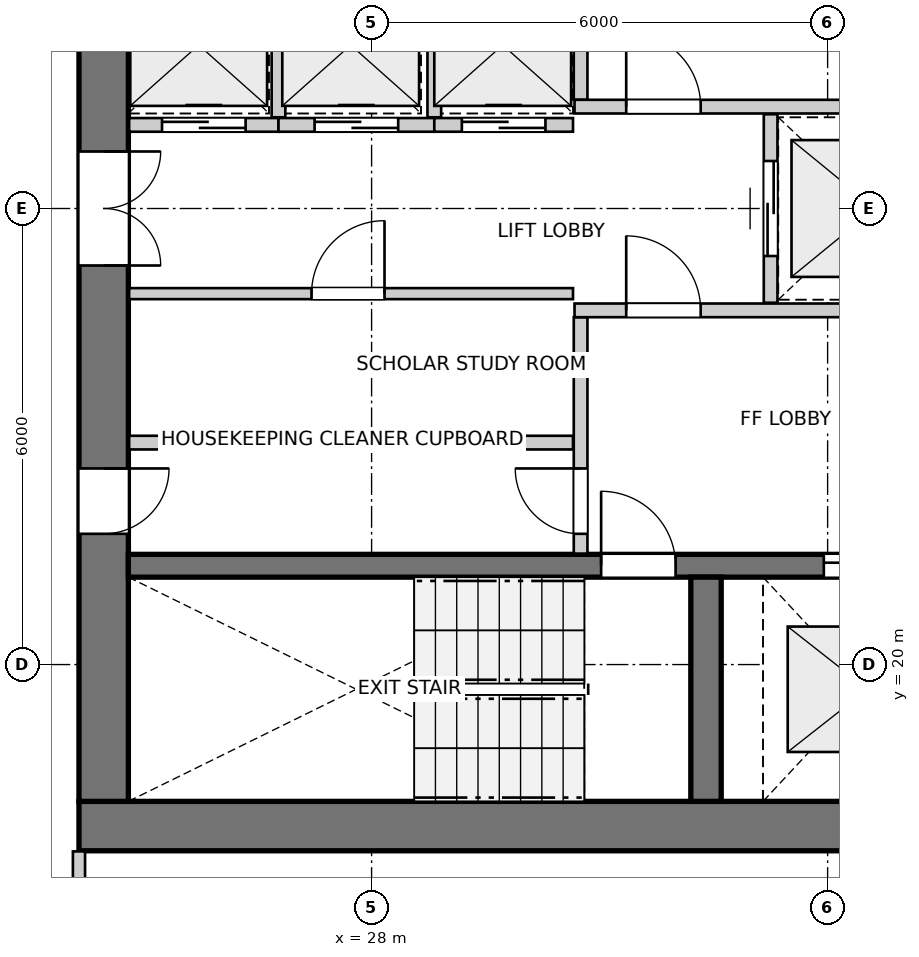
"""IFC4 building model, lengths in metres.
Left out: names, types, materials, properties, quantities, classifications, styles, units other than length and angle.
Written with IfcOpenShell. Run it as: python <this file> out.ifc"""

import sys

from ifc_helpers import new_model, si_unit, direction, frame, frame_2d, origin, place, context, subcontext, project, spatial, rectangle, extrude, source, transform, mapped, element, fill, save


model = new_model("IFC4")
c1 = context("Model", 3, precision=1e-05, world=origin(), true_north=direction((0.0, 1.0)))
c2 = subcontext(c1, "Body", "Model", "MODEL_VIEW")
j1 = project(units=[si_unit("LENGTHUNIT", "METRE"), si_unit("PLANEANGLEUNIT", "RADIAN")], contexts=[c1])
p1 = place(None, origin())
s1 = spatial("IfcSite", under=j1, at=p1, CompositionType="ELEMENT")
p2 = place(p1, origin())
s2 = spatial("IfcBuilding", under=s1, at=p2, CompositionType="ELEMENT")
p3 = place(p2, frame((0.0, 0.0, 133.0)))
s3 = spatial("IfcBuildingStorey", under=s2, at=p3, CompositionType="ELEMENT", Elevation=133.0)
p4 = place(p3, frame((24.15, 17.875, 0.0), z_axis=(0.0, 0.0, 1.0), x_axis=(1.0, 0.0, 0.0)))
e1 = element("IfcWall", 1, at=p4, inside=s3, PredefinedType="SHEAR", context=c2, shape_type="SweptSolid", body=[
    extrude(rectangle(XDim=12.4, YDim=0.65, at=frame_2d((6.2, 0.0))), origin(), (0.0, 0.0, 1.0), 2.95),
])
p5 = place(p3, frame((24.475, 33.8, 0.0), z_axis=(0.0, 0.0, 1.0), x_axis=(0.0, -1.0, 0.0)))
e2 = element("IfcWall", 2, at=p5, inside=s3, PredefinedType="SHEAR", context=c2, shape_type="SweptSolid", body=[
    extrude(rectangle(XDim=15.6, YDim=0.65, at=frame_2d((7.8, 0.0))), origin(), (0.0, 0.0, 1.0), 2.95),
])
p6 = place(p5, frame((7.05, 0.0, 0.0)))
e3 = element("IfcOpeningElement", 3, at=p6, cuts=e2, PredefinedType="OPENING", context=c2, shape_type="SweptSolid", body=[
    extrude(rectangle(XDim=1.5, YDim=2.15, at=frame_2d((0.75, 1.075))), frame((0.0, 0.335, 0.0), z_axis=(0.0, -1.0, 0.0), x_axis=(1.0, 0.0, 0.0)), (0.0, 0.0, 1.0), 0.67),
])
p7 = place(p5, frame((3.52, 0.0, 0.0)))
e4 = element("IfcOpeningElement", 4, at=p7, cuts=e2, PredefinedType="OPENING", context=c2, shape_type="SweptSolid", body=[
    extrude(rectangle(XDim=0.86, YDim=2.05, at=frame_2d((0.43, 1.025))), frame((0.0, 0.335, 0.0), z_axis=(0.0, -1.0, 0.0), x_axis=(1.0, 0.0, 0.0)), (0.0, 0.0, 1.0), 0.67),
])
p8 = place(p5, frame((11.22, 0.0, 0.0)))
e5 = element("IfcOpeningElement", 5, at=p8, cuts=e2, PredefinedType="OPENING", context=c2, shape_type="SweptSolid", body=[
    extrude(rectangle(XDim=0.86, YDim=2.05, at=frame_2d((0.43, 1.025))), frame((0.0, 0.335, 0.0), z_axis=(0.0, -1.0, 0.0), x_axis=(1.0, 0.0, 0.0)), (0.0, 0.0, 1.0), 0.67),
])
p9 = place(p3, frame((24.8, 21.3, 0.0), z_axis=(0.0, 0.0, 1.0), x_axis=(1.0, 0.0, 0.0)))
e6 = element("IfcWall", 6, at=p9, inside=s3, PredefinedType="SHEAR", context=c2, shape_type="SweptSolid", body=[
    extrude(rectangle(XDim=11.1, YDim=0.3, at=frame_2d((5.55, 0.0))), origin(), (0.0, 0.0, 1.0), 2.95),
])
p10 = place(p9, frame((6.22, 0.0, 0.0)))
e7 = element("IfcOpeningElement", 7, at=p10, cuts=e6, PredefinedType="OPENING", context=c2, shape_type="SweptSolid", body=[
    extrude(rectangle(XDim=0.98, YDim=2.15, at=frame_2d((0.49, 1.075))), frame((0.0, 0.16, 0.0), z_axis=(0.0, -1.0, 0.0), x_axis=(1.0, 0.0, 0.0)), (0.0, 0.0, 1.0), 0.32),
])
p11 = place(p9, frame((9.15, 0.0, 0.0)))
e8 = element("IfcOpeningElement", 8, at=p11, cuts=e6, PredefinedType="OPENING", context=c2, shape_type="SweptSolid", body=[
    extrude(rectangle(XDim=1.15, YDim=2.15, at=frame_2d((0.575, 1.075))), frame((0.0, 0.16, 0.0), z_axis=(0.0, -1.0, 0.0), x_axis=(1.0, 0.0, 0.0)), (0.0, 0.0, 1.0), 0.32),
])
p12 = place(p3, frame((32.4, 18.2, 0.0), z_axis=(0.0, 0.0, 1.0), x_axis=(0.0, 1.0, 0.0)))
e9 = element("IfcWall", 9, at=p12, inside=s3, PredefinedType="SHEAR", context=c2, shape_type="SweptSolid", body=[
    extrude(rectangle(XDim=2.95, YDim=0.4, at=frame_2d((1.475, 0.0))), origin(), (0.0, 0.0, 1.0), 2.95),
])
p13 = place(p3, frame((30.75, 21.46, 0.0), z_axis=(0.0, 0.0, 1.0), x_axis=(0.0, 1.0, 0.0)))
e10 = element("IfcWall", 10, at=p13, inside=s3, PredefinedType="PARTITIONING", context=c2, shape_type="SweptSolid", body=[
    extrude(rectangle(XDim=3.11, YDim=0.18, at=frame_2d((1.555, 0.0))), origin(), (0.0, 0.0, 1.0), 2.95),
])
p14 = place(p13, frame((0.26, 0.0, 0.0)))
e11 = element("IfcOpeningElement", 11, at=p14, cuts=e10, PredefinedType="OPENING", context=c2, shape_type="SweptSolid", body=[
    extrude(rectangle(XDim=0.86, YDim=2.05, at=frame_2d((0.43, 1.025))), frame((0.0, 0.1, 0.0), z_axis=(0.0, -1.0, 0.0), x_axis=(1.0, 0.0, 0.0)), (0.0, 0.0, 1.0), 0.2),
])
p15 = place(p3, frame((30.67, 24.66, 0.0), z_axis=(0.0, 0.0, 1.0), x_axis=(1.0, 0.0, 0.0)))
e12 = element("IfcWall", 12, at=p15, inside=s3, PredefinedType="PARTITIONING", context=c2, shape_type="SweptSolid", body=[
    extrude(rectangle(XDim=5.22, YDim=0.18, at=frame_2d((2.61, 0.0))), origin(), (0.0, 0.0, 1.0), 2.95),
])
p16 = place(p15, frame((0.68, 0.0, 0.0)))
e13 = element("IfcOpeningElement", 13, at=p16, cuts=e12, PredefinedType="OPENING", context=c2, shape_type="SweptSolid", body=[
    extrude(rectangle(XDim=0.98, YDim=2.15, at=frame_2d((0.49, 1.075))), frame((0.0, 0.1, 0.0), z_axis=(0.0, -1.0, 0.0), x_axis=(1.0, 0.0, 0.0)), (0.0, 0.0, 1.0), 0.2),
])
p17 = place(p3, frame((30.75, 27.43, 0.0), z_axis=(0.0, 0.0, 1.0), x_axis=(0.0, 1.0, 0.0)))
e14 = element("IfcWall", 14, at=p17, inside=s3, PredefinedType="PARTITIONING", context=c2, shape_type="SweptSolid", body=[
    extrude(rectangle(XDim=3.11, YDim=0.18, at=frame_2d((1.555, 0.0))), origin(), (0.0, 0.0, 1.0), 2.95),
])
p18 = place(p17, frame((1.98, 0.0, 0.0)))
e15 = element("IfcOpeningElement", 15, at=p18, cuts=e14, PredefinedType="OPENING", context=c2, shape_type="SweptSolid", body=[
    extrude(rectangle(XDim=0.86, YDim=2.05, at=frame_2d((0.43, 1.025))), frame((0.0, 0.1, 0.0), z_axis=(0.0, -1.0, 0.0), x_axis=(1.0, 0.0, 0.0)), (0.0, 0.0, 1.0), 0.2),
])
p19 = place(p3, frame((30.67, 27.34, 0.0), z_axis=(0.0, 0.0, 1.0), x_axis=(1.0, 0.0, 0.0)))
e16 = element("IfcWall", 16, at=p19, inside=s3, PredefinedType="PARTITIONING", context=c2, shape_type="SweptSolid", body=[
    extrude(rectangle(XDim=5.22, YDim=0.18, at=frame_2d((2.61, 0.0))), origin(), (0.0, 0.0, 1.0), 2.95),
])
p20 = place(p19, frame((0.68, 0.0, 0.0)))
e17 = element("IfcOpeningElement", 17, at=p20, cuts=e16, PredefinedType="OPENING", context=c2, shape_type="SweptSolid", body=[
    extrude(rectangle(XDim=0.98, YDim=2.15, at=frame_2d((0.49, 1.075))), frame((0.0, 0.1, 0.0), z_axis=(0.0, -1.0, 0.0), x_axis=(1.0, 0.0, 0.0)), (0.0, 0.0, 1.0), 0.2),
])
p21 = place(p3, frame((33.25, 24.76, 0.0), z_axis=(0.0, 0.0, 1.0), x_axis=(0.0, 1.0, 0.0)))
e18 = element("IfcWall", 18, at=p21, inside=s3, PredefinedType="PARTITIONING", context=c2, shape_type="SweptSolid", body=[
    extrude(rectangle(XDim=2.48, YDim=0.18, at=frame_2d((1.24, 0.0))), origin(), (0.0, 0.0, 1.0), 2.95),
])
p22 = place(p21, frame((0.615, 0.0, 0.0)))
e19 = element("IfcOpeningElement", 19, at=p22, cuts=e18, PredefinedType="OPENING", context=c2, shape_type="SweptSolid", body=[
    extrude(rectangle(XDim=1.25, YDim=2.15, at=frame_2d((0.625, 1.075))), frame((0.0, 0.1, 0.0), z_axis=(0.0, -1.0, 0.0), x_axis=(1.0, 0.0, 0.0)), (0.0, 0.0, 1.0), 0.2),
])
p23 = place(p3, frame((24.81, 22.92, 0.0), z_axis=(0.0, 0.0, 1.0), x_axis=(1.0, 0.0, 0.0)))
e20 = element("IfcWall", 20, at=p23, inside=s3, PredefinedType="PARTITIONING", context=c2, shape_type="SweptSolid", body=[
    extrude(rectangle(XDim=5.84, YDim=0.18, at=frame_2d((2.92, 0.0))), origin(), (0.0, 0.0, 1.0), 2.95),
])
p24 = place(p3, frame((24.81, 24.88, 0.0), z_axis=(0.0, 0.0, 1.0), x_axis=(1.0, 0.0, 0.0)))
e21 = element("IfcWall", 21, at=p24, inside=s3, PredefinedType="PARTITIONING", context=c2, shape_type="SweptSolid", body=[
    extrude(rectangle(XDim=5.84, YDim=0.145, at=frame_2d((2.92, 0.0))), origin(), (0.0, 0.0, 1.0), 2.95),
])
p25 = place(p24, frame((2.4, 0.0, 0.0)))
e22 = element("IfcOpeningElement", 22, at=p25, cuts=e21, PredefinedType="OPENING", context=c2, shape_type="SweptSolid", body=[
    extrude(rectangle(XDim=0.96, YDim=2.1, at=frame_2d((0.48, 1.05))), frame((0.0, 0.083, 0.0), z_axis=(0.0, -1.0, 0.0), x_axis=(1.0, 0.0, 0.0)), (0.0, 0.0, 1.0), 0.165),
])
p26 = place(p3, frame((24.81, 27.1, 0.0), z_axis=(0.0, 0.0, 1.0), x_axis=(1.0, 0.0, 0.0)))
e23 = element("IfcWall", 23, at=p26, inside=s3, PredefinedType="PARTITIONING", context=c2, shape_type="SweptSolid", body=[
    extrude(rectangle(XDim=1.965, YDim=0.18, at=frame_2d((0.982, 0.0))), origin(), (0.0, 0.0, 1.0), 2.95),
])
p27 = place(p26, frame((0.433, 0.0, 0.0)))
e24 = element("IfcOpeningElement", 24, at=p27, cuts=e23, PredefinedType="OPENING", context=c2, shape_type="SweptSolid", body=[
    extrude(rectangle(XDim=1.1, YDim=2.15, at=frame_2d((0.55, 1.075))), frame((0.0, 0.1, 0.0), z_axis=(0.0, -1.0, 0.0), x_axis=(1.0, 0.0, 0.0)), (0.0, 0.0, 1.0), 0.2),
])
p28 = place(p3, frame((26.775, 27.1, 0.0), z_axis=(0.0, 0.0, 1.0), x_axis=(1.0, 0.0, 0.0)))
e25 = element("IfcWall", 25, at=p28, inside=s3, PredefinedType="PARTITIONING", context=c2, shape_type="SweptSolid", body=[
    extrude(rectangle(XDim=2.05, YDim=0.18, at=frame_2d((1.025, 0.0))), origin(), (0.0, 0.0, 1.0), 2.95),
])
p29 = place(p28, frame((0.475, 0.0, 0.0)))
e26 = element("IfcOpeningElement", 26, at=p29, cuts=e25, PredefinedType="OPENING", context=c2, shape_type="SweptSolid", body=[
    extrude(rectangle(XDim=1.1, YDim=2.15, at=frame_2d((0.55, 1.075))), frame((0.0, 0.1, 0.0), z_axis=(0.0, -1.0, 0.0), x_axis=(1.0, 0.0, 0.0)), (0.0, 0.0, 1.0), 0.2),
])
p30 = place(p3, frame((26.775, 27.2, 0.0), z_axis=(0.0, 0.0, 1.0), x_axis=(0.0, 1.0, 0.0)))
e27 = element("IfcWall", 27, at=p30, inside=s3, PredefinedType="PARTITIONING", context=c2, shape_type="SweptSolid", body=[
    extrude(rectangle(XDim=1.78, YDim=0.18, at=frame_2d((0.89, 0.0))), origin(), (0.0, 0.0, 1.0), 2.95),
])
p31 = place(p3, frame((28.825, 27.1, 0.0), z_axis=(0.0, 0.0, 1.0), x_axis=(1.0, 0.0, 0.0)))
e28 = element("IfcWall", 28, at=p31, inside=s3, PredefinedType="PARTITIONING", context=c2, shape_type="SweptSolid", body=[
    extrude(rectangle(XDim=1.825, YDim=0.18, at=frame_2d((0.913, 0.0))), origin(), (0.0, 0.0, 1.0), 2.95),
])
p32 = place(p31, frame((0.363, 0.0, 0.0)))
e29 = element("IfcOpeningElement", 29, at=p32, cuts=e28, PredefinedType="OPENING", context=c2, shape_type="SweptSolid", body=[
    extrude(rectangle(XDim=1.1, YDim=2.15, at=frame_2d((0.55, 1.075))), frame((0.0, 0.1, 0.0), z_axis=(0.0, -1.0, 0.0), x_axis=(1.0, 0.0, 0.0)), (0.0, 0.0, 1.0), 0.2),
])
p33 = place(p3, frame((28.825, 27.2, 0.0), z_axis=(0.0, 0.0, 1.0), x_axis=(0.0, 1.0, 0.0)))
e30 = element("IfcWall", 30, at=p33, inside=s3, PredefinedType="PARTITIONING", context=c2, shape_type="SweptSolid", body=[
    extrude(rectangle(XDim=1.78, YDim=0.18, at=frame_2d((0.89, 0.0))), origin(), (0.0, 0.0, 1.0), 2.95),
])
p34 = place(p3, frame((24.15, 13.516, 0.0), z_axis=(0.0, 0.0, 1.0), x_axis=(0.0, 1.0, 0.0)))
e31 = element("IfcWall", 31, at=p34, inside=s3, PredefinedType="PARTITIONING", context=c2, shape_type="SweptSolid", body=[
    extrude(rectangle(XDim=4.026, YDim=0.16, at=frame_2d((2.013, 0.0))), origin(), (0.0, 0.0, 1.0), 2.95),
])
m1 = source(origin(), c2, "Body", "SweptSolid", [
    extrude(rectangle(XDim=0.98, YDim=2.15, at=frame_2d((0.49, 1.075))), frame((0.0, 0.025, 0.0), z_axis=(0.0, -1.0, 0.0), x_axis=(1.0, 0.0, 0.0)), (0.0, 0.0, 1.0), 0.05),
])
p35 = place(p10, origin())
e32 = element("IfcDoor", 32, at=p35, inside=s3, OperationType="SINGLE_SWING_LEFT", PredefinedType="DOOR", context=c2, shape_type="MappedRepresentation", body=[
    mapped(m1, transform((0.0, 0.0, 0.0), x_axis=(1.0, 0.0, 0.0), y_axis=(0.0, 1.0, 0.0), z_axis=(0.0, 0.0, 1.0), scale=1.0)),
])
fill(e7, e32)
m2 = source(origin(), c2, "Body", "SweptSolid", [
    extrude(rectangle(XDim=1.15, YDim=2.15, at=frame_2d((0.575, 1.075))), frame((0.0, 0.025, 0.0), z_axis=(0.0, -1.0, 0.0), x_axis=(1.0, 0.0, 0.0)), (0.0, 0.0, 1.0), 0.05),
])
p36 = place(p11, origin())
e33 = element("IfcDoor", 33, at=p36, inside=s3, OperationType="DOUBLE_DOOR_SLIDING", PredefinedType="DOOR", context=c2, shape_type="MappedRepresentation", body=[
    mapped(m2, transform((0.0, 0.0, 0.0), x_axis=(1.0, 0.0, 0.0), y_axis=(0.0, 1.0, 0.0), z_axis=(0.0, 0.0, 1.0), scale=1.0)),
])
fill(e8, e33)
m3 = source(origin(), c2, "Body", "SweptSolid", [
    extrude(rectangle(XDim=1.5, YDim=2.15, at=frame_2d((0.75, 1.075))), frame((0.0, 0.025, 0.0), z_axis=(0.0, -1.0, 0.0), x_axis=(1.0, 0.0, 0.0)), (0.0, 0.0, 1.0), 0.05),
])
p37 = place(p6, origin())
e34 = element("IfcDoor", 34, at=p37, inside=s3, OperationType="DOUBLE_DOOR_SINGLE_SWING", PredefinedType="DOOR", context=c2, shape_type="MappedRepresentation", body=[
    mapped(m3, transform((0.0, 0.0, 0.0), x_axis=(1.0, 0.0, 0.0), y_axis=(0.0, 1.0, 0.0), z_axis=(0.0, 0.0, 1.0), scale=1.0)),
])
fill(e3, e34)
m4 = source(origin(), c2, "Body", "SweptSolid", [
    extrude(rectangle(XDim=0.86, YDim=2.05, at=frame_2d((0.43, 1.025))), frame((0.0, 0.025, 0.0), z_axis=(0.0, -1.0, 0.0), x_axis=(1.0, 0.0, 0.0)), (0.0, 0.0, 1.0), 0.05),
])
p38 = place(p8, origin())
e35 = element("IfcDoor", 35, at=p38, inside=s3, OperationType="SINGLE_SWING_LEFT", PredefinedType="DOOR", context=c2, shape_type="MappedRepresentation", body=[
    mapped(m4, transform((0.0, 0.0, 0.0), x_axis=(1.0, 0.0, 0.0), y_axis=(0.0, 1.0, 0.0), z_axis=(0.0, 0.0, 1.0), scale=1.0)),
])
fill(e5, e35)
p39 = place(p14, origin())
e36 = element("IfcDoor", 36, at=p39, inside=s3, OperationType="SINGLE_SWING_RIGHT", PredefinedType="DOOR", context=c2, shape_type="MappedRepresentation", body=[
    mapped(m4, transform((0.0, 0.0, 0.0), x_axis=(1.0, 0.0, 0.0), y_axis=(0.0, 1.0, 0.0), z_axis=(0.0, 0.0, 1.0), scale=1.0)),
])
fill(e11, e36)
p40 = place(p16, origin())
e37 = element("IfcDoor", 37, at=p40, inside=s3, OperationType="SINGLE_SWING_LEFT", PredefinedType="DOOR", context=c2, shape_type="MappedRepresentation", body=[
    mapped(m1, transform((0.0, 0.0, 0.0), x_axis=(1.0, 0.0, 0.0), y_axis=(0.0, 1.0, 0.0), z_axis=(0.0, 0.0, 1.0), scale=1.0)),
])
fill(e13, e37)
p41 = place(p20, origin())
e38 = element("IfcDoor", 38, at=p41, inside=s3, OperationType="SINGLE_SWING_LEFT", PredefinedType="DOOR", context=c2, shape_type="MappedRepresentation", body=[
    mapped(m1, transform((0.0, 0.0, 0.0), x_axis=(1.0, 0.0, 0.0), y_axis=(0.0, 1.0, 0.0), z_axis=(0.0, 0.0, 1.0), scale=1.0)),
])
fill(e17, e38)
m5 = source(origin(), c2, "Body", "SweptSolid", [
    extrude(rectangle(XDim=1.25, YDim=2.15, at=frame_2d((0.625, 1.075))), frame((0.0, 0.025, 0.0), z_axis=(0.0, -1.0, 0.0), x_axis=(1.0, 0.0, 0.0)), (0.0, 0.0, 1.0), 0.05),
])
p42 = place(p22, origin())
e39 = element("IfcDoor", 39, at=p42, inside=s3, OperationType="DOUBLE_DOOR_SLIDING", PredefinedType="DOOR", context=c2, shape_type="MappedRepresentation", body=[
    mapped(m5, transform((0.0, 0.0, 0.0), x_axis=(1.0, 0.0, 0.0), y_axis=(0.0, 1.0, 0.0), z_axis=(0.0, 0.0, 1.0), scale=1.0)),
])
fill(e19, e39)
m6 = source(origin(), c2, "Body", "SweptSolid", [
    extrude(rectangle(XDim=0.96, YDim=2.1, at=frame_2d((0.48, 1.05))), frame((0.0, 0.025, 0.0), z_axis=(0.0, -1.0, 0.0), x_axis=(1.0, 0.0, 0.0)), (0.0, 0.0, 1.0), 0.05),
])
p43 = place(p25, origin())
e40 = element("IfcDoor", 40, at=p43, inside=s3, OperationType="SINGLE_SWING_RIGHT", PredefinedType="DOOR", context=c2, shape_type="MappedRepresentation", body=[
    mapped(m6, transform((0.0, 0.0, 0.0), x_axis=(1.0, 0.0, 0.0), y_axis=(0.0, 1.0, 0.0), z_axis=(0.0, 0.0, 1.0), scale=1.0)),
])
fill(e22, e40)
m7 = source(origin(), c2, "Body", "SweptSolid", [
    extrude(rectangle(XDim=1.1, YDim=2.15, at=frame_2d((0.55, 1.075))), frame((0.0, 0.025, 0.0), z_axis=(0.0, -1.0, 0.0), x_axis=(1.0, 0.0, 0.0)), (0.0, 0.0, 1.0), 0.05),
])
p44 = place(p27, origin())
e41 = element("IfcDoor", 41, at=p44, inside=s3, OperationType="DOUBLE_DOOR_SLIDING", PredefinedType="DOOR", context=c2, shape_type="MappedRepresentation", body=[
    mapped(m7, transform((0.0, 0.0, 0.0), x_axis=(1.0, 0.0, 0.0), y_axis=(0.0, 1.0, 0.0), z_axis=(0.0, 0.0, 1.0), scale=1.0)),
])
fill(e24, e41)
p45 = place(p29, origin())
e42 = element("IfcDoor", 42, at=p45, inside=s3, OperationType="DOUBLE_DOOR_SLIDING", PredefinedType="DOOR", context=c2, shape_type="MappedRepresentation", body=[
    mapped(m7, transform((0.0, 0.0, 0.0), x_axis=(1.0, 0.0, 0.0), y_axis=(0.0, 1.0, 0.0), z_axis=(0.0, 0.0, 1.0), scale=1.0)),
])
fill(e26, e42)
p46 = place(p32, origin())
e43 = element("IfcDoor", 43, at=p46, inside=s3, OperationType="DOUBLE_DOOR_SLIDING", PredefinedType="DOOR", context=c2, shape_type="MappedRepresentation", body=[
    mapped(m7, transform((0.0, 0.0, 0.0), x_axis=(1.0, 0.0, 0.0), y_axis=(0.0, 1.0, 0.0), z_axis=(0.0, 0.0, 1.0), scale=1.0)),
])
fill(e29, e43)
save(model, sys.argv[1])
